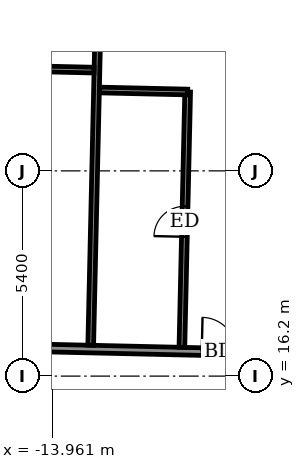
"""IFC4 building model, lengths in metres.
Left out: names, types, materials, properties, quantities, classifications, styles, units other than length and angle.
Written with IfcOpenShell. Run it as: python <this file> out.ifc"""

import sys

from ifc_helpers import new_model, si_unit, direction, frame, frame_2d, origin, place, context, subcontext, project, spatial, rectangle, extrude, element, fill, save


model = new_model("IFC4")
c1 = context("Model", 3, precision=1e-05, world=origin(), true_north=direction((0.0, 1.0)))
c2 = subcontext(c1, "Body", "Model", "MODEL_VIEW")
j1 = project(units=[si_unit("LENGTHUNIT", "METRE"), si_unit("PLANEANGLEUNIT", "RADIAN")], contexts=[c1])
p1 = place(None, origin())
s1 = spatial("IfcSite", under=j1, at=p1, CompositionType="ELEMENT")
p2 = place(p1, origin())
s2 = spatial("IfcBuilding", under=s1, at=p2, CompositionType="ELEMENT")
p3 = place(p2, frame((0.0, 0.0, 316.9)))
s3 = spatial("IfcBuildingStorey", under=s2, at=p3, CompositionType="ELEMENT", Elevation=316.9)
p4 = place(p3, frame((-30.652, 17.313, 0.0), z_axis=(0.0, 0.0, 1.0), x_axis=(0.999742623764, -0.02268669719, 0.0)))
e1 = element("IfcWall", 1, at=p4, inside=s3, PredefinedType="PARTITIONING", context=c2, shape_type="SweptSolid", body=[
    extrude(rectangle(XDim=58.8, YDim=0.2, at=frame_2d((29.4, 0.0))), origin(), (0.0, 0.0, 1.0), 3.05),
])
p5 = place(p4, frame((55.698, 0.0, 0.0)))
e2 = element("IfcOpeningElement", 2, at=p5, cuts=e1, PredefinedType="OPENING", context=c2, shape_type="SweptSolid", body=[
    extrude(rectangle(XDim=1.0, YDim=2.1, at=frame_2d((0.5, 1.05))), frame((0.0, 0.11, 0.0), z_axis=(0.0, -1.0, 0.0), x_axis=(1.0, 0.0, 0.0)), (0.0, 0.0, 1.0), 0.22),
])
p6 = place(p4, frame((49.0, 0.0, 0.0)))
e3 = element("IfcOpeningElement", 3, at=p6, cuts=e1, PredefinedType="OPENING", context=c2, shape_type="SweptSolid", body=[
    extrude(rectangle(XDim=0.9, YDim=2.1, at=frame_2d((0.45, 1.05))), frame((0.0, 0.11, 0.0), z_axis=(0.0, -1.0, 0.0), x_axis=(1.0, 0.0, 0.0)), (0.0, 0.0, 1.0), 0.22),
])
p7 = place(p4, frame((47.125, 0.0, 0.0)))
e4 = element("IfcOpeningElement", 4, at=p7, cuts=e1, PredefinedType="OPENING", context=c2, shape_type="SweptSolid", body=[
    extrude(rectangle(XDim=0.9, YDim=2.1, at=frame_2d((0.45, 1.05))), frame((0.0, 0.11, 0.0), z_axis=(0.0, -1.0, 0.0), x_axis=(1.0, 0.0, 0.0)), (0.0, 0.0, 1.0), 0.22),
])
p8 = place(p4, frame((40.425, 0.0, 0.0)))
e5 = element("IfcOpeningElement", 5, at=p8, cuts=e1, PredefinedType="OPENING", context=c2, shape_type="SweptSolid", body=[
    extrude(rectangle(XDim=0.9, YDim=2.1, at=frame_2d((0.45, 1.05))), frame((0.0, 0.11, 0.0), z_axis=(0.0, -1.0, 0.0), x_axis=(1.0, 0.0, 0.0)), (0.0, 0.0, 1.0), 0.22),
])
p9 = place(p4, frame((38.4, 0.0, 0.0)))
e6 = element("IfcOpeningElement", 6, at=p9, cuts=e1, PredefinedType="OPENING", context=c2, shape_type="SweptSolid", body=[
    extrude(rectangle(XDim=0.9, YDim=2.1, at=frame_2d((0.45, 1.05))), frame((0.0, 0.11, 0.0), z_axis=(0.0, -1.0, 0.0), x_axis=(1.0, 0.0, 0.0)), (0.0, 0.0, 1.0), 0.22),
])
p10 = place(p4, frame((31.6, 0.0, 0.0)))
e7 = element("IfcOpeningElement", 7, at=p10, cuts=e1, PredefinedType="OPENING", context=c2, shape_type="SweptSolid", body=[
    extrude(rectangle(XDim=0.9, YDim=2.1, at=frame_2d((0.45, 1.05))), frame((0.0, 0.11, 0.0), z_axis=(0.0, -1.0, 0.0), x_axis=(1.0, 0.0, 0.0)), (0.0, 0.0, 1.0), 0.22),
])
p11 = place(p4, frame((29.55, 0.0, 0.0)))
e8 = element("IfcOpeningElement", 8, at=p11, cuts=e1, PredefinedType="OPENING", context=c2, shape_type="SweptSolid", body=[
    extrude(rectangle(XDim=0.9, YDim=2.1, at=frame_2d((0.45, 1.05))), frame((0.0, 0.11, 0.0), z_axis=(0.0, -1.0, 0.0), x_axis=(1.0, 0.0, 0.0)), (0.0, 0.0, 1.0), 0.22),
])
p12 = place(p4, frame((22.625, 0.0, 0.0)))
e9 = element("IfcOpeningElement", 9, at=p12, cuts=e1, PredefinedType="OPENING", context=c2, shape_type="SweptSolid", body=[
    extrude(rectangle(XDim=0.9, YDim=2.1, at=frame_2d((0.45, 1.05))), frame((0.0, 0.11, 0.0), z_axis=(0.0, -1.0, 0.0), x_axis=(1.0, 0.0, 0.0)), (0.0, 0.0, 1.0), 0.22),
])
p13 = place(p4, frame((20.625, 0.0, 0.0)))
e10 = element("IfcOpeningElement", 10, at=p13, cuts=e1, PredefinedType="OPENING", context=c2, shape_type="SweptSolid", body=[
    extrude(rectangle(XDim=0.9, YDim=2.1, at=frame_2d((0.45, 1.05))), frame((0.0, 0.11, 0.0), z_axis=(0.0, -1.0, 0.0), x_axis=(1.0, 0.0, 0.0)), (0.0, 0.0, 1.0), 0.22),
])
p14 = place(p4, frame((13.825, 0.0, 0.0)))
e11 = element("IfcOpeningElement", 11, at=p14, cuts=e1, PredefinedType="OPENING", context=c2, shape_type="SweptSolid", body=[
    extrude(rectangle(XDim=0.9, YDim=2.1, at=frame_2d((0.45, 1.05))), frame((0.0, 0.11, 0.0), z_axis=(0.0, -1.0, 0.0), x_axis=(1.0, 0.0, 0.0)), (0.0, 0.0, 1.0), 0.22),
])
p15 = place(p4, frame((11.725, 0.0, 0.0)))
e12 = element("IfcOpeningElement", 12, at=p15, cuts=e1, PredefinedType="OPENING", context=c2, shape_type="SweptSolid", body=[
    extrude(rectangle(XDim=0.9, YDim=2.1, at=frame_2d((0.45, 1.05))), frame((0.0, 0.11, 0.0), z_axis=(0.0, -1.0, 0.0), x_axis=(1.0, 0.0, 0.0)), (0.0, 0.0, 1.0), 0.22),
])
p16 = place(p4, frame((1.85, 0.0, 0.0)))
e13 = element("IfcOpeningElement", 13, at=p16, cuts=e1, PredefinedType="OPENING", context=c2, shape_type="SweptSolid", body=[
    extrude(rectangle(XDim=1.0, YDim=2.1, at=frame_2d((0.5, 1.05))), frame((0.0, 0.11, 0.0), z_axis=(0.0, -1.0, 0.0), x_axis=(1.0, 0.0, 0.0)), (0.0, 0.0, 1.0), 0.22),
])
p17 = place(p4, frame((6.95, 0.0, 0.0)))
e14 = element("IfcOpeningElement", 14, at=p17, cuts=e1, PredefinedType="OPENING", context=c2, shape_type="SweptSolid", body=[
    extrude(rectangle(XDim=0.9, YDim=2.1, at=frame_2d((0.45, 1.05))), frame((0.0, 0.11, 0.0), z_axis=(0.0, -1.0, 0.0), x_axis=(1.0, 0.0, 0.0)), (0.0, 0.0, 1.0), 0.22),
])
p18 = place(p3, frame((-12.954, 17.012, 0.0), z_axis=(0.0, 0.0, 1.0), x_axis=(0.022663260168, 0.999743155335, 0.0)))
e15 = element("IfcWall", 15, at=p18, inside=s3, PredefinedType="PARTITIONING", context=c2, shape_type="SweptSolid", body=[
    extrude(rectangle(XDim=12.399, YDim=0.15, at=frame_2d((6.2, 0.0))), origin(), (0.0, 0.0, 1.0), 2.45),
])
p19 = place(p3, frame((-10.555, 16.957, 0.0), z_axis=(0.0, 0.0, 1.0), x_axis=(0.022598435707, 0.999744622743, 0.0)))
e16 = element("IfcWall", 16, at=p19, inside=s3, PredefinedType="PARTITIONING", context=c2, shape_type="SweptSolid", body=[
    extrude(rectangle(XDim=6.72, YDim=0.15, at=frame_2d((3.36, 0.0))), origin(), (0.0, 0.0, 1.0), 3.05),
])
p20 = place(p19, frame((2.91, 0.0, 0.0)))
e17 = element("IfcOpeningElement", 17, at=p20, cuts=e16, PredefinedType="OPENING", context=c2, shape_type="SweptSolid", body=[
    extrude(rectangle(XDim=0.8, YDim=2.1, at=frame_2d((0.4, 1.05))), frame((0.0, 0.085, 0.0), z_axis=(0.0, -1.0, 0.0), x_axis=(1.0, 0.0, 0.0)), (0.0, 0.0, 1.0), 0.17),
])
p21 = place(p3, frame((-12.727, 23.728, 0.0), z_axis=(0.0, 0.0, 1.0), x_axis=(0.999740260747, -0.02279059109, 0.0)))
e18 = element("IfcWall", 18, at=p21, inside=s3, PredefinedType="PARTITIONING", context=c2, shape_type="SweptSolid", body=[
    extrude(rectangle(XDim=2.324, YDim=0.15, at=frame_2d((1.162, 0.0))), origin(), (0.0, 0.0, 1.0), 3.05),
])
p22 = place(p3, frame((-15.19, 24.304, 0.0), z_axis=(0.0, 0.0, 1.0), x_axis=(0.999740478815, -0.022781023197, 0.0)))
e19 = element("IfcWall", 19, at=p22, inside=s3, PredefinedType="PARTITIONING", context=c2, shape_type="SweptSolid", body=[
    extrude(rectangle(XDim=2.325, YDim=0.15, at=frame_2d((1.163, 0.0))), origin(), (0.0, 0.0, 1.0), 3.05),
])
p23 = place(p13, origin())
e20 = element("IfcDoor", 20, at=p23, inside=s3, OperationType="SINGLE_SWING_RIGHT", PredefinedType="DOOR", context=c2, shape_type="SweptSolid", body=[
    extrude(rectangle(XDim=0.9, YDim=2.1, at=frame_2d((0.45, 1.05))), frame((0.0, 0.025, 0.0), z_axis=(0.0, -1.0, 0.0), x_axis=(1.0, 0.0, 0.0)), (0.0, 0.0, 1.0), 0.05),
])
fill(e10, e20)
p24 = place(p20, origin())
e21 = element("IfcDoor", 21, at=p24, inside=s3, OperationType="SINGLE_SWING_RIGHT", PredefinedType="DOOR", context=c2, shape_type="SweptSolid", body=[
    extrude(rectangle(XDim=0.8, YDim=2.1, at=frame_2d((0.4, 1.05))), frame((0.0, 0.025, 0.0), z_axis=(0.0, -1.0, 0.0), x_axis=(1.0, 0.0, 0.0)), (0.0, 0.0, 1.0), 0.05),
])
fill(e17, e21)
save(model, sys.argv[1])
